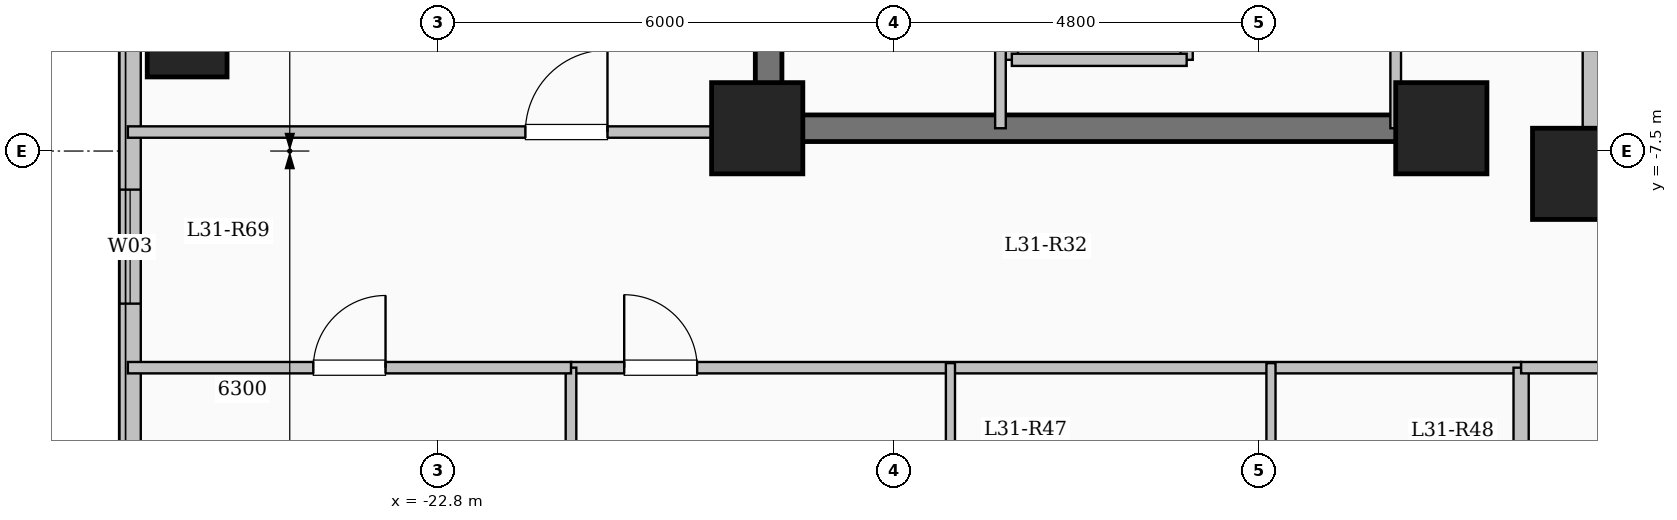
"""IFC4 building model, lengths in metres.
Left out: names, types, materials, properties, quantities, classifications, styles, units other than length and angle.
Written with IfcOpenShell. Run it as: python <this file> out.ifc"""

import sys

from ifc_helpers import new_model, si_unit, direction, frame, frame_2d, origin, origin_2d, place, context, subcontext, project, spatial, rectangle, extrude, element, fill, save


model = new_model("IFC4")
c1 = context("Model", 3, precision=1e-05, world=origin(), true_north=direction((0.0, 1.0)))
c2 = subcontext(c1, "Body", "Model", "MODEL_VIEW")
j1 = project(units=[si_unit("LENGTHUNIT", "METRE"), si_unit("PLANEANGLEUNIT", "RADIAN")], contexts=[c1])
p1 = place(None, origin())
s1 = spatial("IfcSite", under=j1, at=p1, CompositionType="ELEMENT")
p2 = place(p1, origin())
s2 = spatial("IfcBuilding", under=s1, at=p2, CompositionType="ELEMENT")
p3 = place(p2, frame((0.0, 0.0, 115.15)))
s3 = spatial("IfcBuildingStorey", under=s2, at=p3, CompositionType="ELEMENT", Elevation=115.15)
for number, where, z_axis, x_axis in (
    (1, (-7.8, -7.8, 0.0), (0.0, 0.0, 1.0), (1.0, 0.0, 0.0)),
    (2, (-9.6, -7.2, 0.0), (0.0, 0.0, 1.0), (1.0, 0.0, 0.0)),
    (3, (-18.6, -7.2, 0.0), (0.0, 0.0, 1.0), (1.0, 0.0, 0.0)),
):
    element("IfcColumn", number, at=place(p3, frame(where, z_axis=z_axis, x_axis=x_axis)), inside=s3, PredefinedType="COLUMN", context=c2, shape_type="SweptSolid", body=[
        extrude(rectangle(XDim=1.2, YDim=1.2, at=origin_2d()), origin(), (0.0, 0.0, 1.0), 3.35),
    ])
p4 = place(p3, frame((-26.1, -6.0, 0.0), z_axis=(0.0, 0.0, 1.0), x_axis=(1.0, 0.0, 0.0)))
e4 = element("IfcColumn", 4, at=p4, inside=s3, PredefinedType="COLUMN", context=c2, shape_type="SweptSolid", body=[
    extrude(rectangle(XDim=1.05, YDim=1.05, at=origin_2d()), origin(), (0.0, 0.0, 1.0), 3.35),
])
p5 = place(p3, frame((-7.62, -7.62, 0.0), z_axis=(0.0, 0.0, 1.0), x_axis=(1.0, 0.0, 0.0)))
e5 = element("IfcWall", 5, at=p5, inside=s3, PredefinedType="SOLIDWALL", context=c2, shape_type="SweptSolid", body=[
    extrude(rectangle(XDim=15.24, YDim=0.24, at=frame_2d((7.62, 0.0))), origin(), (0.0, 0.0, 1.0), 3.05),
])
p6 = place(p5, frame((6.92, 0.0, 0.95)))
e6 = element("IfcOpeningElement", 6, at=p6, cuts=e5, PredefinedType="OPENING", context=c2, shape_type="SweptSolid", body=[
    extrude(rectangle(XDim=1.4, YDim=1.5, at=frame_2d((0.7, 0.75))), frame((0.0, 0.13, 0.0), z_axis=(0.0, -1.0, 0.0), x_axis=(1.0, 0.0, 0.0)), (0.0, 0.0, 1.0), 0.26),
])
p7 = place(p3, frame((-7.62, 7.62, 0.0), z_axis=(0.0, 0.0, 1.0), x_axis=(0.0, -1.0, 0.0)))
e7 = element("IfcWall", 7, at=p7, inside=s3, PredefinedType="SOLIDWALL", context=c2, shape_type="SweptSolid", body=[
    extrude(rectangle(XDim=15.24, YDim=0.24, at=frame_2d((7.62, 0.0))), origin(), (0.0, 0.0, 1.0), 3.05),
])
p8 = place(p7, frame((6.92, 0.0, 0.95)))
e8 = element("IfcOpeningElement", 8, at=p8, cuts=e7, PredefinedType="OPENING", context=c2, shape_type="SweptSolid", body=[
    extrude(rectangle(XDim=1.4, YDim=1.5, at=frame_2d((0.7, 0.75))), frame((0.0, 0.13, 0.0), z_axis=(0.0, -1.0, 0.0), x_axis=(1.0, 0.0, 0.0)), (0.0, 0.0, 1.0), 0.26),
])
p9 = place(p3, frame((-26.85, -17.85, 0.0), z_axis=(0.0, 0.0, 1.0), x_axis=(0.0, 1.0, 0.0)))
e9 = element("IfcWall", 9, at=p9, inside=s3, PredefinedType="SOLIDWALL", context=c2, shape_type="SweptSolid", body=[
    extrude(rectangle(XDim=35.7, YDim=0.28, at=frame_2d((17.85, 0.0))), origin(), (0.0, 0.0, 1.0), 3.05),
])
p10 = place(p9, frame((2.55, 0.0, 0.9)))
e10 = element("IfcOpeningElement", 10, at=p10, cuts=e9, PredefinedType="OPENING", context=c2, shape_type="SweptSolid", body=[
    extrude(rectangle(XDim=2.4, YDim=1.8, at=frame_2d((1.2, 0.9))), frame((0.0, 0.15, 0.0), z_axis=(0.0, -1.0, 0.0), x_axis=(1.0, 0.0, 0.0)), (0.0, 0.0, 1.0), 0.3),
])
p11 = place(p9, frame((8.343, 0.0, 0.9)))
e11 = element("IfcOpeningElement", 11, at=p11, cuts=e9, PredefinedType="OPENING", context=c2, shape_type="SweptSolid", body=[
    extrude(rectangle(XDim=1.5, YDim=1.65, at=frame_2d((0.75, 0.825))), frame((0.0, 0.15, 0.0), z_axis=(0.0, -1.0, 0.0), x_axis=(1.0, 0.0, 0.0)), (0.0, 0.0, 1.0), 0.3),
])
p12 = place(p9, frame((18.6, 0.0, 0.9)))
e12 = element("IfcOpeningElement", 12, at=p12, cuts=e9, PredefinedType="OPENING", context=c2, shape_type="SweptSolid", body=[
    extrude(rectangle(XDim=2.0, YDim=1.7, at=frame_2d((1.0, 0.85))), frame((0.0, 0.15, 0.0), z_axis=(0.0, -1.0, 0.0), x_axis=(1.0, 0.0, 0.0)), (0.0, 0.0, 1.0), 0.3),
])
p13 = place(p9, frame((28.975, 0.0, 0.95)))
e13 = element("IfcOpeningElement", 13, at=p13, cuts=e9, PredefinedType="OPENING", context=c2, shape_type="SweptSolid", body=[
    extrude(rectangle(XDim=1.0, YDim=1.5, at=frame_2d((0.5, 0.75))), frame((0.0, 0.15, 0.0), z_axis=(0.0, -1.0, 0.0), x_axis=(1.0, 0.0, 0.0)), (0.0, 0.0, 1.0), 0.3),
])
p14 = place(p9, frame((32.025, 0.0, 0.9)))
e14 = element("IfcOpeningElement", 14, at=p14, cuts=e9, PredefinedType="OPENING", context=c2, shape_type="SweptSolid", body=[
    extrude(rectangle(XDim=2.0, YDim=1.7, at=frame_2d((1.0, 0.85))), frame((0.0, 0.15, 0.0), z_axis=(0.0, -1.0, 0.0), x_axis=(1.0, 0.0, 0.0)), (0.0, 0.0, 1.0), 0.3),
])
for number, where, z_axis, x_axis in (
    (15, (-15.25, -6.3, 0.0), (0.0, 0.0, 1.0), (0.0, 1.0, 0.0)),
    (16, (-12.95, -6.3, 0.0), (0.0, 0.0, 1.0), (0.0, 1.0, 0.0)),
):
    element("IfcWall", number, at=place(p3, frame(where, z_axis=z_axis, x_axis=x_axis)), inside=s3, PredefinedType="SOLIDWALL", context=c2, shape_type="SweptSolid", body=[
        extrude(rectangle(XDim=2.6, YDim=0.16, at=frame_2d((1.3, 0.0))), origin(), (0.0, 0.0, 1.0), 3.05),
    ])
p15 = place(p3, frame((-15.25, -6.3, 0.0), z_axis=(0.0, 0.0, 1.0), x_axis=(1.0, 0.0, 0.0)))
e17 = element("IfcWall", 17, at=p15, inside=s3, PredefinedType="SOLIDWALL", context=c2, shape_type="SweptSolid", body=[
    extrude(rectangle(XDim=2.3, YDim=0.16, at=frame_2d((1.15, 0.0))), origin(), (0.0, 0.0, 1.0), 3.05),
])
p16 = place(p3, frame((-18.45, -7.375, 0.0), z_axis=(0.0, 0.0, 1.0), x_axis=(0.0, 1.0, 0.0)))
e18 = element("IfcWall", 18, at=p16, inside=s3, PredefinedType="SHEAR", context=c2, shape_type="SweptSolid", body=[
    extrude(rectangle(XDim=14.05, YDim=0.35, at=frame_2d((7.025, 0.0))), origin(), (0.0, 0.0, 1.0), 3.35),
])
p17 = place(p3, frame((-18.625, -7.2, 0.0), z_axis=(0.0, 0.0, 1.0), x_axis=(1.0, 0.0, 0.0)))
e19 = element("IfcWall", 19, at=p17, inside=s3, PredefinedType="SHEAR", context=c2, shape_type="SweptSolid", body=[
    extrude(rectangle(XDim=8.55, YDim=0.35, at=frame_2d((4.275, 0.0))), origin(), (0.0, 0.0, 1.0), 3.35),
])
p18 = place(p3, frame((-15.4, -7.2, 0.0), z_axis=(0.0, 0.0, 1.0), x_axis=(0.0, 1.0, 0.0)))
e20 = element("IfcWall", 20, at=p18, inside=s3, PredefinedType="PARTITIONING", context=c2, shape_type="SweptSolid", body=[
    extrude(rectangle(XDim=10.45, YDim=0.14, at=frame_2d((5.225, 0.0))), origin(), (0.0, 0.0, 1.0), 3.05),
])
p19 = place(p18, frame((9.25, 0.0, 0.0)))
e21 = element("IfcOpeningElement", 21, at=p19, cuts=e20, PredefinedType="OPENING", context=c2, shape_type="SweptSolid", body=[
    extrude(rectangle(XDim=0.9, YDim=2.08, at=frame_2d((0.45, 1.04))), frame((0.0, 0.08, 0.0), z_axis=(0.0, -1.0, 0.0), x_axis=(1.0, 0.0, 0.0)), (0.0, 0.0, 1.0), 0.16),
])
p20 = place(p3, frame((-10.2, -7.2, 0.0), z_axis=(0.0, 0.0, 1.0), x_axis=(0.0, 1.0, 0.0)))
e22 = element("IfcWall", 22, at=p20, inside=s3, PredefinedType="PARTITIONING", context=c2, shape_type="SweptSolid", body=[
    extrude(rectangle(XDim=9.12, YDim=0.14, at=frame_2d((4.56, 0.0))), origin(), (0.0, 0.0, 1.0), 3.05),
])
p21 = place(p20, frame((1.9, 0.0, 0.0)))
e23 = element("IfcOpeningElement", 23, at=p21, cuts=e22, PredefinedType="OPENING", context=c2, shape_type="SweptSolid", body=[
    extrude(rectangle(XDim=0.95, YDim=2.12, at=frame_2d((0.475, 1.06))), frame((0.0, 0.08, 0.0), z_axis=(0.0, -1.0, 0.0), x_axis=(1.0, 0.0, 0.0)), (0.0, 0.0, 1.0), 0.16),
])
p22 = place(p20, frame((7.75, 0.0, 0.0)))
e24 = element("IfcOpeningElement", 24, at=p22, cuts=e22, PredefinedType="OPENING", context=c2, shape_type="SweptSolid", body=[
    extrude(rectangle(XDim=0.95, YDim=2.12, at=frame_2d((0.475, 1.06))), frame((0.0, 0.08, 0.0), z_axis=(0.0, -1.0, 0.0), x_axis=(1.0, 0.0, 0.0)), (0.0, 0.0, 1.0), 0.16),
])
p23 = place(p3, frame((-21.05, -10.35, 0.0), z_axis=(0.0, 0.0, 1.0), x_axis=(1.0, 0.0, 0.0)))
e25 = element("IfcWall", 25, at=p23, inside=s3, PredefinedType="PARTITIONING", context=c2, shape_type="SweptSolid", body=[
    extrude(rectangle(XDim=12.5, YDim=0.15, at=frame_2d((6.25, 0.0))), origin(), (0.0, 0.0, 1.0), 3.05),
])
p24 = place(p23, frame((0.7, 0.0, 0.0)))
e26 = element("IfcOpeningElement", 26, at=p24, cuts=e25, PredefinedType="OPENING", context=c2, shape_type="SweptSolid", body=[
    extrude(rectangle(XDim=0.96, YDim=2.15, at=frame_2d((0.48, 1.075))), frame((0.0, 0.085, 0.0), z_axis=(0.0, -1.0, 0.0), x_axis=(1.0, 0.0, 0.0)), (0.0, 0.0, 1.0), 0.17),
])
p25 = place(p3, frame((-16.058, -22.1, 0.0), z_axis=(0.0, 0.0, 1.0), x_axis=(0.0, 1.0, 0.0)))
e27 = element("IfcWall", 27, at=p25, inside=s3, PredefinedType="PARTITIONING", context=c2, shape_type="SweptSolid", body=[
    extrude(rectangle(XDim=11.81, YDim=0.12, at=frame_2d((5.905, 0.0))), origin(), (0.0, 0.0, 1.0), 3.05),
])
p26 = place(p25, frame((7.645, 0.0, 0.0)))
e28 = element("IfcOpeningElement", 28, at=p26, cuts=e27, PredefinedType="OPENING", context=c2, shape_type="SweptSolid", body=[
    extrude(rectangle(XDim=1.08, YDim=2.15, at=frame_2d((0.54, 1.075))), frame((0.0, 0.07, 0.0), z_axis=(0.0, -1.0, 0.0), x_axis=(1.0, 0.0, 0.0)), (0.0, 0.0, 1.0), 0.14),
])
p27 = place(p3, frame((-11.841, -13.09, 0.0), z_axis=(0.0, 0.0, 1.0), x_axis=(0.0, 1.0, 0.0)))
e29 = element("IfcWall", 29, at=p27, inside=s3, PredefinedType="PARTITIONING", context=c2, shape_type="SweptSolid", body=[
    extrude(rectangle(XDim=2.8, YDim=0.12, at=frame_2d((1.4, 0.0))), origin(), (0.0, 0.0, 1.0), 3.05),
])
p28 = place(p3, frame((-8.55, -22.704, 0.0), z_axis=(0.0, 0.0, 1.0), x_axis=(0.0, 1.0, 0.0)))
e30 = element("IfcWall", 30, at=p28, inside=s3, PredefinedType="SOLIDWALL", context=c2, shape_type="SweptSolid", body=[
    extrude(rectangle(XDim=12.354, YDim=0.2, at=frame_2d((6.177, 0.0))), origin(), (0.0, 0.0, 1.0), 3.05),
])
p29 = place(p3, frame((-8.55, -10.35, 0.0), z_axis=(0.0, 0.0, 1.0), x_axis=(1.0, 0.0, 0.0)))
e31 = element("IfcWall", 31, at=p29, inside=s3, PredefinedType="PARTITIONING", context=c2, shape_type="SweptSolid", body=[
    extrude(rectangle(XDim=17.1, YDim=0.15, at=frame_2d((8.55, 0.0))), origin(), (0.0, 0.0, 1.0), 3.05),
])
p30 = place(p29, frame((1.15, 0.0, 0.0)))
e32 = element("IfcOpeningElement", 32, at=p30, cuts=e31, PredefinedType="OPENING", context=c2, shape_type="SweptSolid", body=[
    extrude(rectangle(XDim=0.96, YDim=2.15, at=frame_2d((0.48, 1.075))), frame((0.0, 0.085, 0.0), z_axis=(0.0, -1.0, 0.0), x_axis=(1.0, 0.0, 0.0)), (0.0, 0.0, 1.0), 0.17),
])
p31 = place(p29, frame((10.5, 0.0, 0.0)))
e33 = element("IfcOpeningElement", 33, at=p31, cuts=e31, PredefinedType="OPENING", context=c2, shape_type="SweptSolid", body=[
    extrude(rectangle(XDim=0.96, YDim=2.15, at=frame_2d((0.48, 1.075))), frame((0.0, 0.085, 0.0), z_axis=(0.0, -1.0, 0.0), x_axis=(1.0, 0.0, 0.0)), (0.0, 0.0, 1.0), 0.17),
])
p32 = place(p3, frame((-26.88, -7.25, 0.0), z_axis=(0.0, 0.0, 1.0), x_axis=(1.0, 0.0, 0.0)))
e34 = element("IfcWall", 34, at=p32, inside=s3, PredefinedType="PARTITIONING", context=c2, shape_type="SweptSolid", body=[
    extrude(rectangle(XDim=8.43, YDim=0.15, at=frame_2d((4.215, 0.0))), origin(), (0.0, 0.0, 1.0), 3.05),
])
p33 = place(p32, frame((5.23, 0.0, 0.0)))
e35 = element("IfcOpeningElement", 35, at=p33, cuts=e34, PredefinedType="OPENING", context=c2, shape_type="SweptSolid", body=[
    extrude(rectangle(XDim=1.08, YDim=2.15, at=frame_2d((0.54, 1.075))), frame((0.0, 0.085, 0.0), z_axis=(0.0, -1.0, 0.0), x_axis=(1.0, 0.0, 0.0)), (0.0, 0.0, 1.0), 0.17),
])
p34 = place(p3, frame((-21.05, -17.85, 0.0), z_axis=(0.0, 0.0, 1.0), x_axis=(0.0, 1.0, 0.0)))
e36 = element("IfcWall", 36, at=p34, inside=s3, PredefinedType="PARTITIONING", context=c2, shape_type="SweptSolid", body=[
    extrude(rectangle(XDim=7.5, YDim=0.14, at=frame_2d((3.75, 0.0))), origin(), (0.0, 0.0, 1.0), 3.05),
])
p35 = place(p3, frame((-26.88, -10.35, 0.0), z_axis=(0.0, 0.0, 1.0), x_axis=(1.0, 0.0, 0.0)))
e37 = element("IfcWall", 37, at=p35, inside=s3, PredefinedType="PARTITIONING", context=c2, shape_type="SweptSolid", body=[
    extrude(rectangle(XDim=5.83, YDim=0.15, at=frame_2d((2.915, 0.0))), origin(), (0.0, 0.0, 1.0), 3.05),
])
p36 = place(p35, frame((2.44, 0.0, 0.0)))
e38 = element("IfcOpeningElement", 38, at=p36, cuts=e37, PredefinedType="OPENING", context=c2, shape_type="SweptSolid", body=[
    extrude(rectangle(XDim=0.95, YDim=2.15, at=frame_2d((0.475, 1.075))), frame((0.0, 0.085, 0.0), z_axis=(0.0, -1.0, 0.0), x_axis=(1.0, 0.0, 0.0)), (0.0, 0.0, 1.0), 0.17),
])
p37 = place(p11, origin())
e39 = element("IfcWindow", 39, at=p37, inside=s3, PartitioningType="SINGLE_PANEL", PredefinedType="WINDOW", context=c2, shape_type="SweptSolid", body=[
    extrude(rectangle(XDim=1.5, YDim=1.65, at=frame_2d((0.75, 0.825))), frame((0.0, 0.03, 0.0), z_axis=(0.0, -1.0, 0.0), x_axis=(1.0, 0.0, 0.0)), (0.0, 0.0, 1.0), 0.06),
])
fill(e11, e39)
p38 = place(p24, origin())
e40 = element("IfcDoor", 40, at=p38, inside=s3, OperationType="SINGLE_SWING_LEFT", PredefinedType="DOOR", context=c2, shape_type="SweptSolid", body=[
    extrude(rectangle(XDim=0.96, YDim=2.15, at=frame_2d((0.48, 1.075))), frame((0.0, 0.025, 0.0), z_axis=(0.0, -1.0, 0.0), x_axis=(1.0, 0.0, 0.0)), (0.0, 0.0, 1.0), 0.05),
])
fill(e26, e40)
p39 = place(p36, origin())
e41 = element("IfcDoor", 41, at=p39, inside=s3, OperationType="SINGLE_SWING_RIGHT", PredefinedType="DOOR", context=c2, shape_type="SweptSolid", body=[
    extrude(rectangle(XDim=0.95, YDim=2.15, at=frame_2d((0.475, 1.075))), frame((0.0, 0.025, 0.0), z_axis=(0.0, -1.0, 0.0), x_axis=(1.0, 0.0, 0.0)), (0.0, 0.0, 1.0), 0.05),
])
fill(e38, e41)
p40 = place(p33, origin())
e42 = element("IfcDoor", 42, at=p40, inside=s3, OperationType="SINGLE_SWING_RIGHT", PredefinedType="DOOR", context=c2, shape_type="SweptSolid", body=[
    extrude(rectangle(XDim=1.08, YDim=2.15, at=frame_2d((0.54, 1.075))), frame((0.0, 0.025, 0.0), z_axis=(0.0, -1.0, 0.0), x_axis=(1.0, 0.0, 0.0)), (0.0, 0.0, 1.0), 0.05),
])
fill(e35, e42)
save(model, sys.argv[1])
